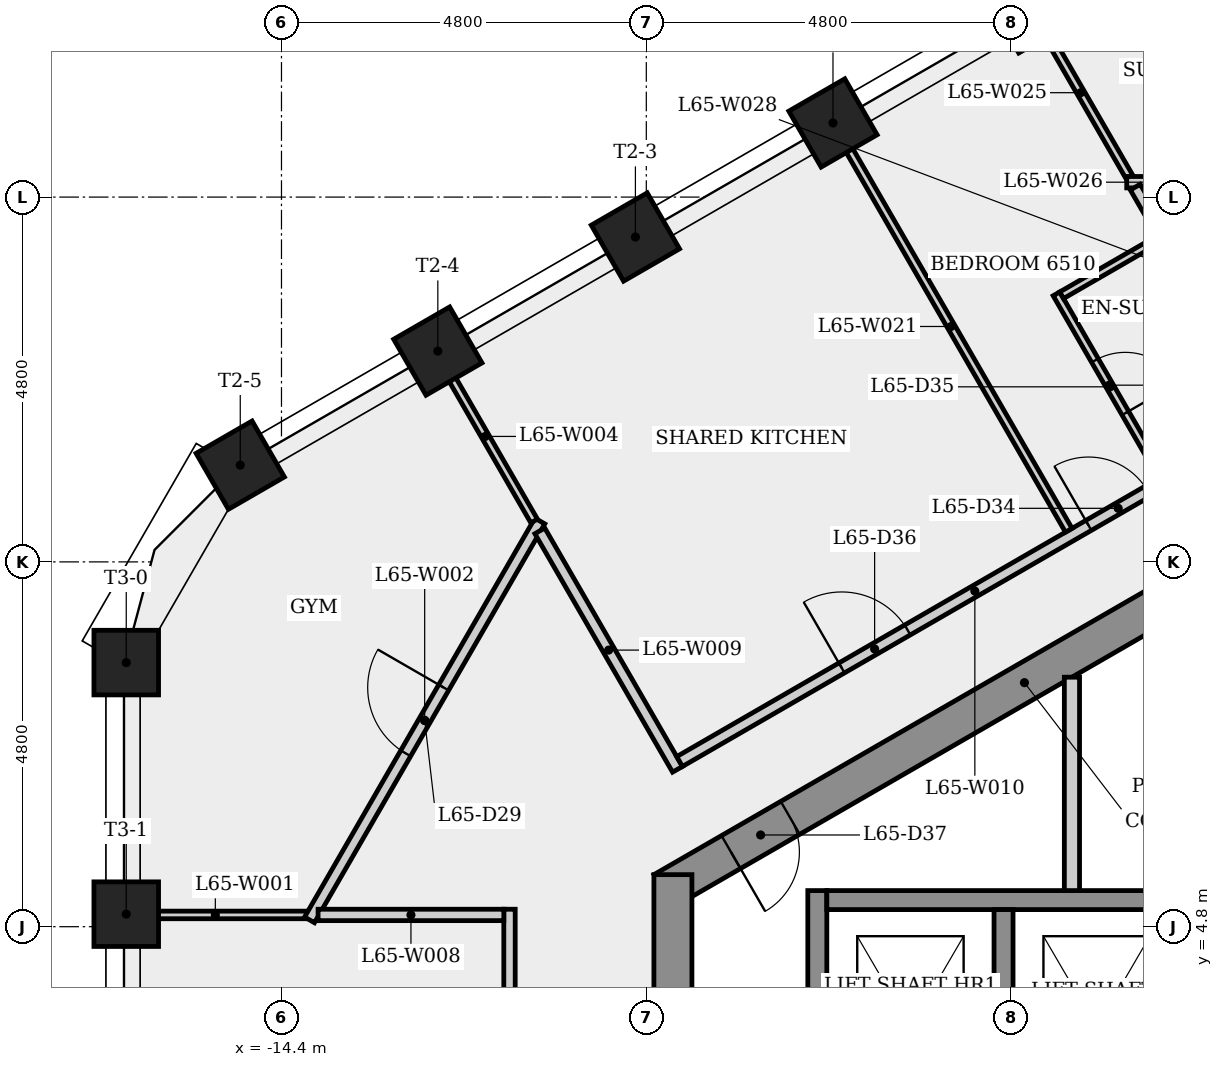
"""IFC4 building model, lengths in metres.
Left out: names, types, materials, properties, quantities, classifications, styles, units other than length and angle.
Written with IfcOpenShell. Run it as: python <this file> out.ifc"""

import sys

from ifc_helpers import new_model, si_unit, direction, frame, frame_2d, origin, origin_2d, place, context, subcontext, project, spatial, rectangle, extrude, element, fill, save


model = new_model("IFC4")
c1 = context("Model", 3, precision=1e-05, world=origin(), true_north=direction((0.0, 1.0)))
c2 = subcontext(c1, "Body", "Model", "MODEL_VIEW")
j1 = project(units=[si_unit("LENGTHUNIT", "METRE"), si_unit("PLANEANGLEUNIT", "RADIAN")], contexts=[c1])
p1 = place(None, origin())
s1 = spatial("IfcSite", under=j1, at=p1, CompositionType="ELEMENT")
p2 = place(p1, origin())
s2 = spatial("IfcBuilding", under=s1, at=p2, CompositionType="ELEMENT")
p3 = place(p2, frame((0.0, 0.0, 242.7)))
s3 = spatial("IfcBuildingStorey", under=s2, at=p3, CompositionType="ELEMENT", Elevation=242.7)
p4 = place(p3, frame((0.125, 10.753, 0.0), z_axis=(0.0, 0.0, 1.0), x_axis=(-0.866023993627, -0.500002442456, 0.0)))
e1 = element("IfcWall", 1, at=p4, inside=s3, PredefinedType="SHEAR", context=c2, shape_type="SweptSolid", body=[
    extrude(rectangle(XDim=10.97, YDim=0.5, at=frame_2d((5.485, 0.0))), origin(), (0.0, 0.0, 1.0), 3.4),
])
p5 = place(p4, frame((9.043, 0.0, 0.0)))
e2 = element("IfcOpeningElement", 2, at=p5, cuts=e1, PredefinedType="OPENING", context=c2, shape_type="SweptSolid", body=[
    extrude(rectangle(XDim=0.9, YDim=2.1, at=frame_2d((0.45, 1.05))), frame((0.0, 0.26, 0.0), z_axis=(0.0, -1.0, 0.0), x_axis=(1.0, 0.0, 0.0)), (0.0, 0.0, 1.0), 0.52),
])
p6 = place(p4, frame((2.38, 0.0, 0.0)))
e3 = element("IfcOpeningElement", 3, at=p6, cuts=e1, PredefinedType="OPENING", context=c2, shape_type="SweptSolid", body=[
    extrude(rectangle(XDim=0.9, YDim=2.1, at=frame_2d((0.45, 1.05))), frame((0.0, 0.26, 0.0), z_axis=(0.0, -1.0, 0.0), x_axis=(1.0, 0.0, 0.0)), (0.0, 0.0, 1.0), 0.52),
])
p7 = place(p3, frame((-9.25, 5.485, 0.0), z_axis=(0.0, 0.0, 1.0), x_axis=(0.0, -1.0, 0.0)))
e4 = element("IfcWall", 4, at=p7, inside=s3, PredefinedType="SHEAR", context=c2, shape_type="SweptSolid", body=[
    extrude(rectangle(XDim=10.97, YDim=0.5, at=frame_2d((5.485, 0.0))), origin(), (0.0, 0.0, 1.0), 3.4),
])
p8 = place(p7, frame((8.51, 0.0, 0.0)))
e5 = element("IfcOpeningElement", 5, at=p8, cuts=e4, PredefinedType="OPENING", context=c2, shape_type="SweptSolid", body=[
    extrude(rectangle(XDim=0.9, YDim=2.1, at=frame_2d((0.45, 1.05))), frame((0.0, 0.26, 0.0), z_axis=(0.0, -1.0, 0.0), x_axis=(1.0, 0.0, 0.0)), (0.0, 0.0, 1.0), 0.52),
])
p9 = place(p7, frame((4.685, 0.0, 0.0)))
e6 = element("IfcOpeningElement", 6, at=p9, cuts=e4, PredefinedType="OPENING", context=c2, shape_type="SweptSolid", body=[
    extrude(rectangle(XDim=1.6, YDim=2.1, at=frame_2d((0.8, 1.05))), frame((0.0, 0.26, 0.0), z_axis=(0.0, -1.0, 0.0), x_axis=(1.0, 0.0, 0.0)), (0.0, 0.0, 1.0), 0.52),
])
for number, where, z_axis, x_axis in (
    (7, (-4.545, 16.876, 0.0), (0.0, 0.0, 1.0), (-0.5, 0.866, 0.0)),
    (8, (-7.144, 15.375, 0.0), (0.0, 0.0, 1.0), (-0.5, 0.866, 0.0)),
    (9, (-9.743, 13.875, 0.0), (0.0, 0.0, 1.0), (-0.5, 0.866, 0.0)),
    (10, (-12.343, 12.374, 0.0), (0.0, 0.0, 1.0), (-0.5, 0.866, 0.0)),
    (11, (-14.942, 10.873, 0.0), (0.0, 0.0, 1.0), (-0.5, 0.866, 0.0)),
    (12, (-16.442, 8.275, 0.0), (0.0, 0.0, 1.0), (-1.0, 0.0, 0.0)),
    (13, (-16.442, 4.965, 0.0), (0.0, 0.0, 1.0), (-1.0, 0.0, 0.0)),
):
    element("IfcColumn", number, at=place(p3, frame(where, z_axis=z_axis, x_axis=x_axis)), inside=s3, PredefinedType="COLUMN", context=c2, shape_type="SweptSolid", body=[
        extrude(rectangle(XDim=0.85, YDim=0.85, at=origin_2d()), origin(), (0.0, 0.0, 1.0), 3.4),
    ])
p10 = place(p3, frame((-14.069, 4.955, 0.0), z_axis=(0.0, 0.0, 1.0), x_axis=(-1.0, 0.0, 0.0)))
e14 = element("IfcWall", 14, at=p10, inside=s3, PredefinedType="PARTITIONING", context=c2, shape_type="SweptSolid", body=[
    extrude(rectangle(XDim=2.404, YDim=0.1, at=frame_2d((1.202, 0.0))), origin(), (0.0, 0.0, 1.0), 3.05),
])
p11 = place(p3, frame((-14.031, 4.89, 0.0), z_axis=(0.0, 0.0, 1.0), x_axis=(0.499973530083, 0.866040685659, 0.0)))
e15 = element("IfcWall", 15, at=p11, inside=s3, PredefinedType="PARTITIONING", context=c2, shape_type="SweptSolid", body=[
    extrude(rectangle(XDim=6.06, YDim=0.15, at=frame_2d((3.03, 0.0))), origin(), (0.0, 0.0, 1.0), 3.05),
])
p12 = place(p11, frame((2.53, 0.0, 0.0)))
e16 = element("IfcOpeningElement", 16, at=p12, cuts=e15, PredefinedType="OPENING", context=c2, shape_type="SweptSolid", body=[
    extrude(rectangle(XDim=1.0, YDim=2.1, at=frame_2d((0.5, 1.05))), frame((0.0, 0.085, 0.0), z_axis=(0.0, -1.0, 0.0), x_axis=(1.0, 0.0, 0.0)), (0.0, 0.0, 1.0), 0.17),
])
p13 = place(p3, frame((-12.361, 12.364, 0.0), z_axis=(0.0, 0.0, 1.0), x_axis=(0.499960970066, -0.866047936555, 0.0)))
e17 = element("IfcWall", 17, at=p13, inside=s3, PredefinedType="PARTITIONING", context=c2, shape_type="SweptSolid", body=[
    extrude(rectangle(XDim=2.57, YDim=0.1, at=frame_2d((1.285, 0.0))), origin(), (0.0, 0.0, 1.0), 3.05),
])
p14 = place(p3, frame((-11.4, -4.955, 0.0), z_axis=(0.0, 0.0, 1.0), x_axis=(0.0, 1.0, 0.0)))
e18 = element("IfcWall", 18, at=p14, inside=s3, PredefinedType="PARTITIONING", context=c2, shape_type="SweptSolid", body=[
    extrude(rectangle(XDim=9.984, YDim=0.15, at=frame_2d((4.992, 0.0))), origin(), (0.0, 0.0, 1.0), 3.05),
])
p15 = place(p14, frame((6.106, 0.0, 0.0)))
e19 = element("IfcOpeningElement", 19, at=p15, cuts=e18, PredefinedType="OPENING", context=c2, shape_type="SweptSolid", body=[
    extrude(rectangle(XDim=1.0, YDim=2.1, at=frame_2d((0.5, 1.05))), frame((0.0, 0.085, 0.0), z_axis=(0.0, -1.0, 0.0), x_axis=(1.0, 0.0, 0.0)), (0.0, 0.0, 1.0), 0.17),
])
p16 = place(p14, frame((1.151, 0.0, 0.0)))
e20 = element("IfcOpeningElement", 20, at=p16, cuts=e18, PredefinedType="OPENING", context=c2, shape_type="SweptSolid", body=[
    extrude(rectangle(XDim=1.0, YDim=2.1, at=frame_2d((0.5, 1.05))), frame((0.0, 0.085, 0.0), z_axis=(0.0, -1.0, 0.0), x_axis=(1.0, 0.0, 0.0)), (0.0, 0.0, 1.0), 0.17),
])
p17 = place(p3, frame((-11.475, 4.955, 0.0), z_axis=(0.0, 0.0, 1.0), x_axis=(-1.0, 0.0, 0.0)))
e21 = element("IfcWall", 21, at=p17, inside=s3, PredefinedType="PARTITIONING", context=c2, shape_type="SweptSolid", body=[
    extrude(rectangle(XDim=2.444, YDim=0.15, at=frame_2d((1.222, 0.0))), origin(), (0.0, 0.0, 1.0), 3.05),
])
p18 = place(p3, frame((-11.001, 10.008, 0.0), z_axis=(0.0, 0.0, 1.0), x_axis=(0.500053022251, -0.865994789209, 0.0)))
e22 = element("IfcWall", 22, at=p18, inside=s3, PredefinedType="PARTITIONING", context=c2, shape_type="SweptSolid", body=[
    extrude(rectangle(XDim=3.623, YDim=0.15, at=frame_2d((1.811, 0.0))), origin(), (0.0, 0.0, 1.0), 3.05),
])
p19 = place(p3, frame((-9.162, 6.973, 0.0), z_axis=(0.0, 0.0, 1.0), x_axis=(0.866025611375, 0.499999640442, 0.0)))
e23 = element("IfcWall", 23, at=p19, inside=s3, PredefinedType="PARTITIONING", context=c2, shape_type="SweptSolid", body=[
    extrude(rectangle(XDim=8.971, YDim=0.15, at=frame_2d((4.486, 0.0))), origin(), (0.0, 0.0, 1.0), 3.05),
])
p20 = place(p19, frame((6.213, 0.0, 0.0)))
e24 = element("IfcOpeningElement", 24, at=p20, cuts=e23, PredefinedType="OPENING", context=c2, shape_type="SweptSolid", body=[
    extrude(rectangle(XDim=0.9, YDim=2.1, at=frame_2d((0.45, 1.05))), frame((0.0, 0.085, 0.0), z_axis=(0.0, -1.0, 0.0), x_axis=(1.0, 0.0, 0.0)), (0.0, 0.0, 1.0), 0.17),
])
p21 = place(p19, frame((2.463, 0.0, 0.0)))
e25 = element("IfcOpeningElement", 25, at=p21, cuts=e23, PredefinedType="OPENING", context=c2, shape_type="SweptSolid", body=[
    extrude(rectangle(XDim=1.0, YDim=2.1, at=frame_2d((0.5, 1.05))), frame((0.0, 0.085, 0.0), z_axis=(0.0, -1.0, 0.0), x_axis=(1.0, 0.0, 0.0)), (0.0, 0.0, 1.0), 0.17),
])
p22 = place(p3, frame((-7.35, 1.925, 0.0), z_axis=(0.0, 0.0, 1.0), x_axis=(0.0, 1.0, 0.0)))
e26 = element("IfcWall", 26, at=p22, inside=s3, PredefinedType="SHEAR", context=c2, shape_type="SweptSolid", body=[
    extrude(rectangle(XDim=3.35, YDim=0.25, at=frame_2d((1.675, 0.0))), origin(), (0.0, 0.0, 1.0), 3.05),
])
p23 = place(p3, frame((-7.225, 5.15, 0.0), z_axis=(0.0, 0.0, 1.0), x_axis=(1.0, 0.0, 0.0)))
e27 = element("IfcWall", 27, at=p23, inside=s3, PredefinedType="SHEAR", context=c2, shape_type="SweptSolid", body=[
    extrude(rectangle(XDim=14.7, YDim=0.25, at=frame_2d((7.35, 0.0))), origin(), (0.0, 0.0, 1.0), 3.05),
])
p24 = place(p3, frame((-4.9, 5.025, 0.0), z_axis=(0.0, 0.0, 1.0), x_axis=(0.0, -1.0, 0.0)))
e28 = element("IfcWall", 28, at=p24, inside=s3, PredefinedType="SHEAR", context=c2, shape_type="SweptSolid", body=[
    extrude(rectangle(XDim=3.1, YDim=0.25, at=frame_2d((1.55, 0.0))), origin(), (0.0, 0.0, 1.0), 3.4),
])
p25 = place(p3, frame((-4.204, 13.127, 0.0), z_axis=(0.0, 0.0, 1.0), x_axis=(0.50000932403, -0.866020020486, 0.0)))
e29 = element("IfcWall", 29, at=p25, inside=s3, PredefinedType="PARTITIONING", context=c2, shape_type="SweptSolid", body=[
    extrude(rectangle(XDim=2.775, YDim=0.1, at=frame_2d((1.387, 0.0))), origin(), (0.0, 0.0, 1.0), 3.05),
])
p26 = place(p25, frame((1.012, 0.0, 0.0)))
e30 = element("IfcOpeningElement", 30, at=p26, cuts=e29, PredefinedType="OPENING", context=c2, shape_type="SweptSolid", body=[
    extrude(rectangle(XDim=0.8, YDim=2.1, at=frame_2d((0.4, 1.05))), frame((0.0, 0.06, 0.0), z_axis=(0.0, -1.0, 0.0), x_axis=(1.0, 0.0, 0.0)), (0.0, 0.0, 1.0), 0.12),
])
p27 = place(p3, frame((-4.042, 10.016, 0.0), z_axis=(0.0, 0.0, 1.0), x_axis=(-0.500027320894, 0.866009629484, 0.0)))
e31 = element("IfcWall", 31, at=p27, inside=s3, PredefinedType="PARTITIONING", context=c2, shape_type="SweptSolid", body=[
    extrude(rectangle(XDim=6.193, YDim=0.1, at=frame_2d((3.096, 0.0))), origin(), (0.0, 0.0, 1.0), 3.05),
])
p28 = place(p3, frame((-4.0, 8.083, 0.0), z_axis=(0.0, 0.0, 1.0), x_axis=(0.0, -1.0, 0.0)))
e32 = element("IfcWall", 32, at=p28, inside=s3, PredefinedType="PARTITIONING", context=c2, shape_type="SweptSolid", body=[
    extrude(rectangle(XDim=2.808, YDim=0.2, at=frame_2d((1.404, 0.0))), origin(), (0.0, 0.0, 1.0), 3.05),
])
p29 = place(p3, frame((-3.242, 14.661, 0.0), z_axis=(0.0, 0.0, 1.0), x_axis=(-0.499991089772, 0.866030548046, 0.0)))
e33 = element("IfcWall", 33, at=p29, inside=s3, PredefinedType="PARTITIONING", context=c2, shape_type="SweptSolid", body=[
    extrude(rectangle(XDim=2.57, YDim=0.1, at=frame_2d((1.285, 0.0))), origin(), (0.0, 0.0, 1.0), 3.05),
])
p30 = place(p3, frame((-3.279, 14.596, 0.0), z_axis=(0.0, 0.0, 1.0), x_axis=(1.0, 0.0, 0.0)))
e34 = element("IfcWall", 34, at=p30, inside=s3, PredefinedType="PARTITIONING", context=c2, shape_type="SweptSolid", body=[
    extrude(rectangle(XDim=3.268, YDim=0.15, at=frame_2d((1.634, 0.0))), origin(), (0.0, 0.0, 1.0), 3.05),
])
p31 = place(p30, frame((1.189, 0.0, 0.0)))
e35 = element("IfcOpeningElement", 35, at=p31, cuts=e34, PredefinedType="OPENING", context=c2, shape_type="SweptSolid", body=[
    extrude(rectangle(XDim=1.0, YDim=2.1, at=frame_2d((0.5, 1.05))), frame((0.0, 0.085, 0.0), z_axis=(0.0, -1.0, 0.0), x_axis=(1.0, 0.0, 0.0)), (0.0, 0.0, 1.0), 0.17),
])
p32 = place(p3, frame((-2.858, 13.846, 0.0), z_axis=(0.0, 0.0, 1.0), x_axis=(-0.866003658127, -0.500037662692, 0.0)))
e36 = element("IfcWall", 36, at=p32, inside=s3, PredefinedType="PARTITIONING", context=c2, shape_type="SweptSolid", body=[
    extrude(rectangle(XDim=1.475, YDim=0.1, at=frame_2d((0.738, 0.0))), origin(), (0.0, 0.0, 1.0), 3.05),
])
p33 = place(p3, frame((-3.167, 14.531, 0.0), z_axis=(0.0, 0.0, 1.0), x_axis=(0.500017912207, -0.86601506192, 0.0)))
e37 = element("IfcWall", 37, at=p33, inside=s3, PredefinedType="PARTITIONING", context=c2, shape_type="SweptSolid", body=[
    extrude(rectangle(XDim=3.243, YDim=0.15, at=frame_2d((1.621, 0.0))), origin(), (0.0, 0.0, 1.0), 3.05),
])
p34 = place(p12, origin())
e38 = element("IfcDoor", 38, at=p34, inside=s3, OperationType="SINGLE_SWING_RIGHT", PredefinedType="DOOR", context=c2, shape_type="SweptSolid", body=[
    extrude(rectangle(XDim=1.0, YDim=2.1, at=frame_2d((0.5, 1.05))), frame((0.0, 0.025, 0.0), z_axis=(0.0, -1.0, 0.0), x_axis=(1.0, 0.0, 0.0)), (0.0, 0.0, 1.0), 0.05),
])
fill(e16, e38)
p35 = place(p20, origin())
e39 = element("IfcDoor", 39, at=p35, inside=s3, OperationType="SINGLE_SWING_LEFT", PredefinedType="DOOR", context=c2, shape_type="SweptSolid", body=[
    extrude(rectangle(XDim=0.9, YDim=2.1, at=frame_2d((0.45, 1.05))), frame((0.0, 0.025, 0.0), z_axis=(0.0, -1.0, 0.0), x_axis=(1.0, 0.0, 0.0)), (0.0, 0.0, 1.0), 0.05),
])
fill(e24, e39)
p36 = place(p26, origin())
e40 = element("IfcDoor", 40, at=p36, inside=s3, OperationType="SINGLE_SWING_RIGHT", PredefinedType="DOOR", context=c2, shape_type="SweptSolid", body=[
    extrude(rectangle(XDim=0.8, YDim=2.1, at=frame_2d((0.4, 1.05))), frame((0.0, 0.025, 0.0), z_axis=(0.0, -1.0, 0.0), x_axis=(1.0, 0.0, 0.0)), (0.0, 0.0, 1.0), 0.05),
])
fill(e30, e40)
p37 = place(p21, origin())
e41 = element("IfcDoor", 41, at=p37, inside=s3, OperationType="SINGLE_SWING_LEFT", PredefinedType="DOOR", context=c2, shape_type="SweptSolid", body=[
    extrude(rectangle(XDim=1.0, YDim=2.1, at=frame_2d((0.5, 1.05))), frame((0.0, 0.025, 0.0), z_axis=(0.0, -1.0, 0.0), x_axis=(1.0, 0.0, 0.0)), (0.0, 0.0, 1.0), 0.05),
])
fill(e25, e41)
p38 = place(p5, origin())
e42 = element("IfcDoor", 42, at=p38, inside=s3, OperationType="SINGLE_SWING_RIGHT", PredefinedType="DOOR", context=c2, shape_type="SweptSolid", body=[
    extrude(rectangle(XDim=0.9, YDim=2.1, at=frame_2d((0.45, 1.05))), frame((0.0, 0.025, 0.0), z_axis=(0.0, -1.0, 0.0), x_axis=(1.0, 0.0, 0.0)), (0.0, 0.0, 1.0), 0.05),
])
fill(e2, e42)
save(model, sys.argv[1])
